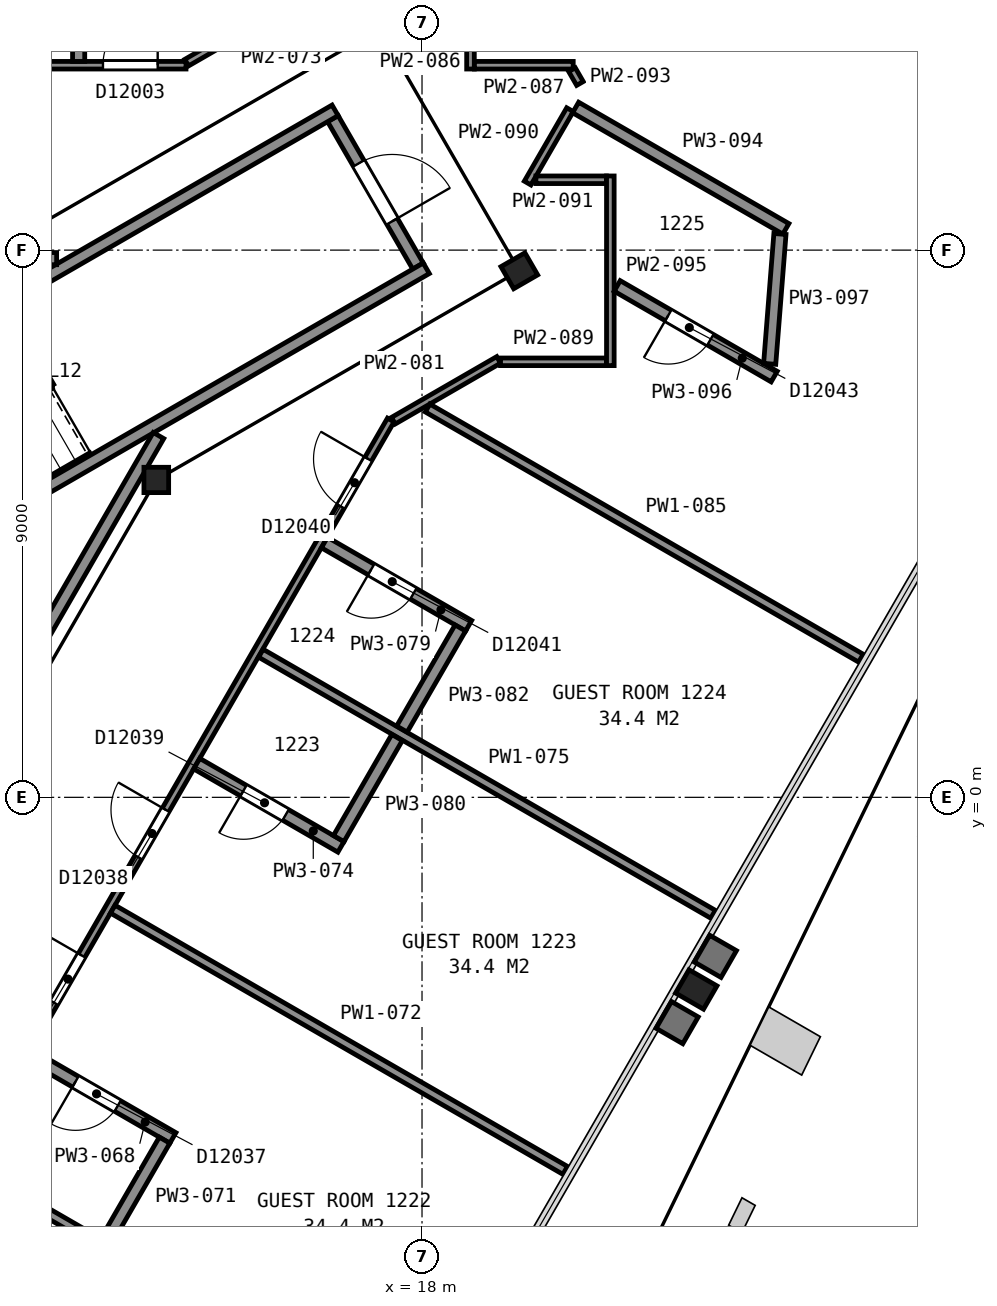
"""IFC4 building model, lengths in metres.
Left out: names, types, materials, properties, quantities, classifications, styles, units other than length and angle.
Written with IfcOpenShell. Run it as: python <this file> out.ifc"""

import sys

from ifc_helpers import new_model, si_unit, direction, frame, frame_2d, origin, origin_2d, place, context, subcontext, project, spatial, rectangle, i_section, extrude, element, fill, save


model = new_model("IFC4")
c1 = context("Model", 3, precision=1e-05, world=origin(), true_north=direction((0.0, 1.0)))
c2 = subcontext(c1, "Body", "Model", "MODEL_VIEW")
j1 = project(units=[si_unit("LENGTHUNIT", "METRE"), si_unit("PLANEANGLEUNIT", "RADIAN")], contexts=[c1])
p1 = place(None, origin())
s1 = spatial("IfcSite", under=j1, at=p1, CompositionType="ELEMENT")
p2 = place(p1, origin())
s2 = spatial("IfcBuilding", under=s1, at=p2, CompositionType="ELEMENT")
p3 = place(p2, frame((0.0, 0.0, 58.4)))
s3 = spatial("IfcBuildingStorey", under=s2, at=p3, CompositionType="ELEMENT", Elevation=58.4)
p4 = place(p3, frame((22.51, -3.16, 0.0), z_axis=(0.0, 0.0, 1.0), x_axis=(-0.5, -0.866025403784, 0.0)))
e1 = element("IfcColumn", 1, at=p4, inside=s3, PredefinedType="COLUMN", context=c2, shape_type="SweptSolid", body=[
    extrude(i_section(OverallWidth=0.442, OverallDepth=0.531, WebThickness=0.066, FlangeThickness=0.106, FilletRadius=0.015, at=origin_2d()), origin(), (0.0, 0.0, 1.0), 3.575),
])
p5 = place(p3, frame((13.63, 5.22, 0.0), z_axis=(0.0, 0.0, 1.0), x_axis=(1.0, 0.0, 0.0)))
e2 = element("IfcColumn", 2, at=p5, inside=s3, PredefinedType="COLUMN", context=c2, shape_type="SweptSolid", body=[
    extrude(i_section(OverallWidth=0.406, OverallDepth=0.417, WebThickness=0.03, FlangeThickness=0.048, FilletRadius=0.015, at=origin_2d()), origin(), (0.0, 0.0, 1.0), 3.6),
])
p6 = place(p3, frame((19.6, 8.66, 0.0), z_axis=(0.0, 0.0, 1.0), x_axis=(0.5, -0.866025403784, 0.0)))
e3 = element("IfcColumn", 3, at=p6, inside=s3, PredefinedType="COLUMN", context=c2, shape_type="SweptSolid", body=[
    extrude(i_section(OverallWidth=0.419, OverallDepth=0.455, WebThickness=0.042, FlangeThickness=0.068, FilletRadius=0.015, at=origin_2d()), origin(), (0.0, 0.0, 1.0), 3.6),
])
p7 = place(p3, frame((17.934, 8.738, 0.0), z_axis=(0.0, 0.0, 1.0), x_axis=(-0.49998411664, 0.866034573852, 0.0)))
e4 = element("IfcWall", 4, at=p7, inside=s3, PredefinedType="PARTITIONING", context=c2, shape_type="SweptSolid", body=[
    extrude(rectangle(XDim=2.8, YDim=0.2, at=frame_2d((1.4, 0.0))), origin(), (0.0, 0.0, 1.0), 3.35),
])
p8 = place(p7, frame((0.85, 0.0, 0.0)))
e5 = element("IfcOpeningElement", 5, at=p8, cuts=e4, PredefinedType="OPENING", context=c2, shape_type="SweptSolid", body=[
    extrude(rectangle(XDim=1.1, YDim=2.1, at=frame_2d((0.55, 1.05))), frame((0.0, 0.11, 0.0), z_axis=(0.0, -1.0, 0.0), x_axis=(1.0, 0.0, 0.0)), (0.0, 0.0, 1.0), 0.22),
])
for number, where, z_axis, x_axis in (
    (6, (6.178, 5.299, 0.0), (0.0, 0.0, 1.0), (0.866, 0.5, 0.0)),
    (7, (7.678, 2.701, 0.0), (0.0, 0.0, 1.0), (0.866, 0.5, 0.0)),
):
    element("IfcWall", number, at=place(p3, frame(where, z_axis=z_axis, x_axis=x_axis)), inside=s3, PredefinedType="PARTITIONING", context=c2, shape_type="SweptSolid", body=[
        extrude(rectangle(XDim=12.0, YDim=0.2, at=frame_2d((6.0, 0.0))), origin(), (0.0, 0.0, 1.0), 3.35),
    ])
p9 = place(p3, frame((6.177, 8.86, 0.0), z_axis=(0.0, 0.0, 1.0), x_axis=(1.0, 0.0, 0.0)))
e8 = element("IfcWall", 8, at=p9, inside=s3, PredefinedType="PARTITIONING", context=c2, shape_type="SweptSolid", body=[
    extrude(rectangle(XDim=5.814, YDim=0.2, at=frame_2d((2.907, 0.0))), origin(), (0.0, 0.0, 1.0), 3.35),
])
p10 = place(p3, frame((8.492, -3.012, 0.0), z_axis=(0.0, 0.0, 1.0), x_axis=(0.499972957231, 0.866041016371, 0.0)))
e9 = element("IfcWall", 9, at=p10, inside=s3, PredefinedType="PARTITIONING", context=c2, shape_type="SweptSolid", body=[
    extrude(rectangle(XDim=10.349, YDim=0.2, at=frame_2d((5.174, 0.0))), origin(), (0.0, 0.0, 1.0), 3.35),
])
p11 = place(p3, frame((-9.036, 12.041, 0.0), z_axis=(0.0, 0.0, 1.0), x_axis=(1.0, 0.0, 0.0)))
e10 = element("IfcWall", 10, at=p11, inside=s3, PredefinedType="PARTITIONING", context=c2, shape_type="SweptSolid", body=[
    extrude(rectangle(XDim=23.154, YDim=0.125, at=frame_2d((11.577, 0.0))), origin(), (0.0, 0.0, 1.0), 2.613),
])
p12 = place(p11, frame((21.789, 0.0, 0.0)))
e11 = element("IfcOpeningElement", 11, at=p12, cuts=e10, PredefinedType="OPENING", context=c2, shape_type="SweptSolid", body=[
    extrude(rectangle(XDim=0.9, YDim=2.1, at=frame_2d((0.45, 1.05))), frame((0.0, 0.073, 0.0), z_axis=(0.0, -1.0, 0.0), x_axis=(1.0, 0.0, 0.0)), (0.0, 0.0, 1.0), 0.145),
])
p13 = place(p11, frame((15.375, 0.0, 0.0)))
e12 = element("IfcOpeningElement", 12, at=p13, cuts=e10, PredefinedType="OPENING", context=c2, shape_type="SweptSolid", body=[
    extrude(rectangle(XDim=0.9, YDim=2.1, at=frame_2d((0.45, 1.05))), frame((0.0, 0.073, 0.0), z_axis=(0.0, -1.0, 0.0), x_axis=(1.0, 0.0, 0.0)), (0.0, 0.0, 1.0), 0.145),
])
p14 = place(p11, frame((12.81, 0.0, 0.0)))
e13 = element("IfcOpeningElement", 13, at=p14, cuts=e10, PredefinedType="OPENING", context=c2, shape_type="SweptSolid", body=[
    extrude(rectangle(XDim=0.9, YDim=2.1, at=frame_2d((0.45, 1.05))), frame((0.0, 0.073, 0.0), z_axis=(0.0, -1.0, 0.0), x_axis=(1.0, 0.0, 0.0)), (0.0, 0.0, 1.0), 0.145),
])
p15 = place(p11, frame((6.046, 0.0, 0.0)))
e14 = element("IfcOpeningElement", 14, at=p15, cuts=e10, PredefinedType="OPENING", context=c2, shape_type="SweptSolid", body=[
    extrude(rectangle(XDim=0.9, YDim=2.1, at=frame_2d((0.45, 1.05))), frame((0.0, 0.073, 0.0), z_axis=(0.0, -1.0, 0.0), x_axis=(1.0, 0.0, 0.0)), (0.0, 0.0, 1.0), 0.145),
])
p16 = place(p11, frame((3.224, 0.0, 0.0)))
e15 = element("IfcOpeningElement", 15, at=p16, cuts=e10, PredefinedType="OPENING", context=c2, shape_type="SweptSolid", body=[
    extrude(rectangle(XDim=0.9, YDim=2.1, at=frame_2d((0.45, 1.05))), frame((0.0, 0.073, 0.0), z_axis=(0.0, -1.0, 0.0), x_axis=(1.0, 0.0, 0.0)), (0.0, 0.0, 1.0), 0.145),
])
p17 = place(p3, frame((17.486, 6.206, 0.0), z_axis=(0.0, 0.0, 1.0), x_axis=(-0.499990458811, -0.866030912322, 0.0)))
e16 = element("IfcWall", 16, at=p17, inside=s3, PredefinedType="PARTITIONING", context=c2, shape_type="SweptSolid", body=[
    extrude(rectangle(XDim=27.441, YDim=0.125, at=frame_2d((13.721, 0.0))), origin(), (0.0, 0.0, 1.0), 2.613),
])
p18 = place(p17, frame((20.529, 0.0, 0.0)))
e17 = element("IfcOpeningElement", 17, at=p18, cuts=e16, PredefinedType="OPENING", context=c2, shape_type="SweptSolid", body=[
    extrude(rectangle(XDim=0.9, YDim=2.1, at=frame_2d((0.45, 1.05))), frame((0.0, 0.073, 0.0), z_axis=(0.0, -1.0, 0.0), x_axis=(1.0, 0.0, 0.0)), (0.0, 0.0, 1.0), 0.145),
])
p19 = place(p17, frame((17.516, 0.0, 0.0)))
e18 = element("IfcOpeningElement", 18, at=p19, cuts=e16, PredefinedType="OPENING", context=c2, shape_type="SweptSolid", body=[
    extrude(rectangle(XDim=0.9, YDim=2.1, at=frame_2d((0.45, 1.05))), frame((0.0, 0.073, 0.0), z_axis=(0.0, -1.0, 0.0), x_axis=(1.0, 0.0, 0.0)), (0.0, 0.0, 1.0), 0.145),
])
p20 = place(p17, frame((10.168, 0.0, 0.0)))
e19 = element("IfcOpeningElement", 19, at=p20, cuts=e16, PredefinedType="OPENING", context=c2, shape_type="SweptSolid", body=[
    extrude(rectangle(XDim=0.9, YDim=2.1, at=frame_2d((0.45, 1.05))), frame((0.0, 0.073, 0.0), z_axis=(0.0, -1.0, 0.0), x_axis=(1.0, 0.0, 0.0)), (0.0, 0.0, 1.0), 0.145),
])
p21 = place(p17, frame((7.403, 0.0, 0.0)))
e20 = element("IfcOpeningElement", 20, at=p21, cuts=e16, PredefinedType="OPENING", context=c2, shape_type="SweptSolid", body=[
    extrude(rectangle(XDim=0.9, YDim=2.1, at=frame_2d((0.45, 1.05))), frame((0.0, 0.073, 0.0), z_axis=(0.0, -1.0, 0.0), x_axis=(1.0, 0.0, 0.0)), (0.0, 0.0, 1.0), 0.145),
])
p22 = place(p17, frame((0.741, 0.0, 0.0)))
e21 = element("IfcOpeningElement", 21, at=p22, cuts=e16, PredefinedType="OPENING", context=c2, shape_type="SweptSolid", body=[
    extrude(rectangle(XDim=0.9, YDim=2.1, at=frame_2d((0.45, 1.05))), frame((0.0, 0.073, 0.0), z_axis=(0.0, -1.0, 0.0), x_axis=(1.0, 0.0, 0.0)), (0.0, 0.0, 1.0), 0.145),
])
p23 = place(p3, frame((10.482, -6.051, 0.0), z_axis=(0.0, 0.0, 1.0), x_axis=(0.865978298045, -0.500081580659, 0.0)))
e22 = element("IfcWall", 22, at=p23, inside=s3, PredefinedType="PARTITIONING", context=c2, shape_type="SweptSolid", body=[
    extrude(rectangle(XDim=8.591, YDim=0.15, at=frame_2d((4.296, 0.0))), origin(), (0.0, 0.0, 1.0), 2.613),
])
p24 = place(p3, frame((13.903, -5.602, 0.0), z_axis=(0.0, 0.0, 1.0), x_axis=(-0.86596722502, 0.50010075504, 0.0)))
e23 = element("IfcWall", 23, at=p24, inside=s3, PredefinedType="PARTITIONING", context=c2, shape_type="SweptSolid", body=[
    extrude(rectangle(XDim=2.737, YDim=0.2, at=frame_2d((1.369, 0.0))), origin(), (0.0, 0.0, 1.0), 2.613),
])
p25 = place(p24, frame((1.05, 0.0, 0.0)))
e24 = element("IfcOpeningElement", 24, at=p25, cuts=e23, PredefinedType="OPENING", context=c2, shape_type="SweptSolid", body=[
    extrude(rectangle(XDim=0.8, YDim=2.1, at=frame_2d((0.4, 1.05))), frame((0.0, 0.11, 0.0), z_axis=(0.0, -1.0, 0.0), x_axis=(1.0, 0.0, 0.0)), (0.0, 0.0, 1.0), 0.22),
])
p26 = place(p3, frame((12.353, 12.104, 0.0), z_axis=(0.0, 0.0, 1.0), x_axis=(0.0, 1.0, 0.0)))
e25 = element("IfcWall", 25, at=p26, inside=s3, PredefinedType="PARTITIONING", context=c2, shape_type="SweptSolid", body=[
    extrude(rectangle(XDim=2.837, YDim=0.2, at=frame_2d((1.419, 0.0))), origin(), (0.0, 0.0, 1.0), 2.613),
])
p27 = place(p3, frame((12.803, -7.305, 0.0), z_axis=(0.0, 0.0, 1.0), x_axis=(0.500150762069, 0.865938343765, 0.0)))
e26 = element("IfcWall", 26, at=p27, inside=s3, PredefinedType="PARTITIONING", context=c2, shape_type="SweptSolid", body=[
    extrude(rectangle(XDim=1.924, YDim=0.2, at=frame_2d((0.962, 0.0))), origin(), (0.0, 0.0, 1.0), 2.613),
])
p28 = place(p3, frame((12.914, -1.839, 0.0), z_axis=(0.0, 0.0, 1.0), x_axis=(0.866010015463, -0.500026652407, 0.0)))
e27 = element("IfcWall", 27, at=p28, inside=s3, PredefinedType="PARTITIONING", context=c2, shape_type="SweptSolid", body=[
    extrude(rectangle(XDim=8.591, YDim=0.15, at=frame_2d((4.296, 0.0))), origin(), (0.0, 0.0, 1.0), 2.613),
])
p29 = place(p3, frame((14.13, 12.083, 0.0), z_axis=(0.0, 0.0, 1.0), x_axis=(0.865936922628, 0.500153222552, 0.0)))
e28 = element("IfcWall", 28, at=p29, inside=s3, PredefinedType="PARTITIONING", context=c2, shape_type="SweptSolid", body=[
    extrude(rectangle(XDim=1.995, YDim=0.125, at=frame_2d((0.998, 0.0))), origin(), (0.0, 0.0, 1.0), 2.613),
])
p30 = place(p3, frame((14.295, 0.554, 0.0), z_axis=(0.0, 0.0, 1.0), x_axis=(0.866095017657, -0.499879405846, 0.0)))
e29 = element("IfcWall", 29, at=p30, inside=s3, PredefinedType="PARTITIONING", context=c2, shape_type="SweptSolid", body=[
    extrude(rectangle(XDim=2.738, YDim=0.2, at=frame_2d((1.369, 0.0))), origin(), (0.0, 0.0, 1.0), 2.613),
])
p31 = place(p30, frame((0.887, 0.0, 0.0)))
e30 = element("IfcOpeningElement", 30, at=p31, cuts=e29, PredefinedType="OPENING", context=c2, shape_type="SweptSolid", body=[
    extrude(rectangle(XDim=0.8, YDim=2.1, at=frame_2d((0.4, 1.05))), frame((0.0, 0.11, 0.0), z_axis=(0.0, -1.0, 0.0), x_axis=(1.0, 0.0, 0.0)), (0.0, 0.0, 1.0), 0.22),
])
p32 = place(p3, frame((15.349, 2.37, 0.0), z_axis=(0.0, 0.0, 1.0), x_axis=(0.866033609522, -0.499985786976, 0.0)))
e31 = element("IfcWall", 31, at=p32, inside=s3, PredefinedType="PARTITIONING", context=c2, shape_type="SweptSolid", body=[
    extrude(rectangle(XDim=8.587, YDim=0.15, at=frame_2d((4.293, 0.0))), origin(), (0.0, 0.0, 1.0), 2.613),
])
p33 = place(p3, frame((18.767, 2.822, 0.0), z_axis=(0.0, 0.0, 1.0), x_axis=(-0.866117296485, 0.499840803386, 0.0)))
e32 = element("IfcWall", 32, at=p33, inside=s3, PredefinedType="PARTITIONING", context=c2, shape_type="SweptSolid", body=[
    extrude(rectangle(XDim=2.738, YDim=0.2, at=frame_2d((1.369, 0.0))), origin(), (0.0, 0.0, 1.0), 2.613),
])
p34 = place(p33, frame((1.051, 0.0, 0.0)))
e33 = element("IfcOpeningElement", 33, at=p34, cuts=e32, PredefinedType="OPENING", context=c2, shape_type="SweptSolid", body=[
    extrude(rectangle(XDim=0.8, YDim=2.1, at=frame_2d((0.4, 1.05))), frame((0.0, 0.11, 0.0), z_axis=(0.0, -1.0, 0.0), x_axis=(1.0, 0.0, 0.0)), (0.0, 0.0, 1.0), 0.22),
])
p35 = place(p3, frame((16.63, -0.678, 0.0), z_axis=(0.0, 0.0, 1.0), x_axis=(0.49992795321, 0.866066996022, 0.0)))
e34 = element("IfcWall", 34, at=p35, inside=s3, PredefinedType="PARTITIONING", context=c2, shape_type="SweptSolid", body=[
    extrude(rectangle(XDim=1.92, YDim=0.2, at=frame_2d((0.96, 0.0))), origin(), (0.0, 0.0, 1.0), 2.613),
])
p36 = place(p3, frame((17.529, 6.195, 0.0), z_axis=(0.0, 0.0, 1.0), x_axis=(0.866002566612, 0.500039553057, 0.0)))
e35 = element("IfcWall", 35, at=p36, inside=s3, PredefinedType="PARTITIONING", context=c2, shape_type="SweptSolid", body=[
    extrude(rectangle(XDim=1.999, YDim=0.125, at=frame_2d((1.0, 0.0))), origin(), (0.0, 0.0, 1.0), 2.613),
])
p37 = place(p3, frame((17.669, 1.123, 0.0), z_axis=(0.0, 0.0, 1.0), x_axis=(0.500269123289, 0.865869969617, 0.0)))
e36 = element("IfcWall", 36, at=p37, inside=s3, PredefinedType="PARTITIONING", context=c2, shape_type="SweptSolid", body=[
    extrude(rectangle(XDim=1.92, YDim=0.2, at=frame_2d((0.96, 0.0))), origin(), (0.0, 0.0, 1.0), 2.613),
])
p38 = place(p3, frame((18.091, 6.403, 0.0), z_axis=(0.0, 0.0, 1.0), x_axis=(0.866038366034, -0.499977548053, 0.0)))
e37 = element("IfcWall", 37, at=p38, inside=s3, PredefinedType="PARTITIONING", context=c2, shape_type="SweptSolid", body=[
    extrude(rectangle(XDim=8.229, YDim=0.15, at=frame_2d((4.115, 0.0))), origin(), (0.0, 0.0, 1.0), 2.613),
])
p39 = place(p3, frame((18.797, 14.072, 0.0), z_axis=(0.0, 0.0, 1.0), x_axis=(0.0, -1.0, 0.0)))
e38 = element("IfcWall", 38, at=p39, inside=s3, PredefinedType="PARTITIONING", context=c2, shape_type="SweptSolid", body=[
    extrude(rectangle(XDim=2.094, YDim=0.125, at=frame_2d((1.047, 0.0))), origin(), (0.0, 0.0, 1.0), 2.613),
])
p40 = place(p39, frame((0.531, 0.0, 0.0)))
e39 = element("IfcOpeningElement", 39, at=p40, cuts=e38, PredefinedType="OPENING", context=c2, shape_type="SweptSolid", body=[
    extrude(rectangle(XDim=0.9, YDim=2.1, at=frame_2d((0.45, 1.05))), frame((0.0, 0.073, 0.0), z_axis=(0.0, -1.0, 0.0), x_axis=(1.0, 0.0, 0.0)), (0.0, 0.0, 1.0), 0.145),
])
p41 = place(p3, frame((18.862, 12.041, 0.0), z_axis=(0.0, 0.0, 1.0), x_axis=(1.0, 0.0, 0.0)))
e40 = element("IfcWall", 40, at=p41, inside=s3, PredefinedType="PARTITIONING", context=c2, shape_type="SweptSolid", body=[
    extrude(rectangle(XDim=1.625, YDim=0.125, at=frame_2d((0.812, 0.0))), origin(), (0.0, 0.0, 1.0), 2.613),
])
p42 = place(p3, frame((19.291, 7.163, 0.0), z_axis=(0.0, 0.0, 1.0), x_axis=(1.0, 0.0, 0.0)))
e41 = element("IfcWall", 41, at=p42, inside=s3, PredefinedType="PARTITIONING", context=c2, shape_type="SweptSolid", body=[
    extrude(rectangle(XDim=1.741, YDim=0.125, at=frame_2d((0.871, 0.0))), origin(), (0.0, 0.0, 1.0), 2.613),
])
p43 = place(p3, frame((19.737, 10.103, 0.0), z_axis=(0.0, 0.0, 1.0), x_axis=(0.499944854726, 0.866057239582, 0.0)))
e42 = element("IfcWall", 42, at=p43, inside=s3, PredefinedType="PARTITIONING", context=c2, shape_type="SweptSolid", body=[
    extrude(rectangle(XDim=1.394, YDim=0.125, at=frame_2d((0.697, 0.0))), origin(), (0.0, 0.0, 1.0), 2.613),
])
p44 = place(p3, frame((19.873, 10.157, 0.0), z_axis=(0.0, 0.0, 1.0), x_axis=(1.0, 0.0, 0.0)))
e43 = element("IfcWall", 43, at=p44, inside=s3, PredefinedType="PARTITIONING", context=c2, shape_type="SweptSolid", body=[
    extrude(rectangle(XDim=1.159, YDim=0.125, at=frame_2d((0.58, 0.0))), origin(), (0.0, 0.0, 1.0), 2.613),
])
p45 = place(p3, frame((20.467, 11.967, 0.0), z_axis=(0.0, 0.0, 1.0), x_axis=(0.500153222552, -0.865936922628, 0.0)))
e44 = element("IfcWall", 44, at=p45, inside=s3, PredefinedType="PARTITIONING", context=c2, shape_type="SweptSolid", body=[
    extrude(rectangle(XDim=0.262, YDim=0.125, at=frame_2d((0.131, 0.0))), origin(), (0.0, 0.0, 1.0), 2.613),
])
p46 = place(p3, frame((20.526, 11.346, 0.0), z_axis=(0.0, 0.0, 1.0), x_axis=(0.866089865591, -0.499888332251, 0.0)))
e45 = element("IfcWall", 45, at=p46, inside=s3, PredefinedType="PARTITIONING", context=c2, shape_type="SweptSolid", body=[
    extrude(rectangle(XDim=3.992, YDim=0.2, at=frame_2d((1.996, 0.0))), origin(), (0.0, 0.0, 1.0), 2.613),
])
p47 = place(p3, frame((21.097, 7.101, 0.0), z_axis=(0.0, 0.0, 1.0), x_axis=(0.0, 1.0, 0.0)))
e46 = element("IfcWall", 46, at=p47, inside=s3, PredefinedType="PARTITIONING", context=c2, shape_type="SweptSolid", body=[
    extrude(rectangle(XDim=3.119, YDim=0.125, at=frame_2d((1.56, 0.0))), origin(), (0.0, 0.0, 1.0), 2.613),
])
p48 = place(p3, frame((21.209, 8.411, 0.0), z_axis=(0.0, 0.0, 1.0), x_axis=(0.86595648724, -0.500119347963, 0.0)))
e47 = element("IfcWall", 47, at=p48, inside=s3, PredefinedType="PARTITIONING", context=c2, shape_type="SweptSolid", body=[
    extrude(rectangle(XDim=2.982, YDim=0.2, at=frame_2d((1.491, 0.0))), origin(), (0.0, 0.0, 1.0), 2.613),
])
p49 = place(p48, frame((0.97, 0.0, 0.0)))
e48 = element("IfcOpeningElement", 48, at=p49, cuts=e47, PredefinedType="OPENING", context=c2, shape_type="SweptSolid", body=[
    extrude(rectangle(XDim=0.8, YDim=2.1, at=frame_2d((0.4, 1.05))), frame((0.0, 0.11, 0.0), z_axis=(0.0, -1.0, 0.0), x_axis=(1.0, 0.0, 0.0)), (0.0, 0.0, 1.0), 0.22),
])
p50 = place(p3, frame((23.718, 7.129, 0.0), z_axis=(0.0, 0.0, 1.0), x_axis=(0.078848500899, 0.996886610355, 0.0)))
e49 = element("IfcWall", 49, at=p50, inside=s3, PredefinedType="PARTITIONING", context=c2, shape_type="SweptSolid", body=[
    extrude(rectangle(XDim=2.143, YDim=0.2, at=frame_2d((1.071, 0.0))), origin(), (0.0, 0.0, 1.0), 2.613),
])
p51 = place(p8, origin())
e50 = element("IfcDoor", 50, at=p51, inside=s3, OperationType="SINGLE_SWING_LEFT", PredefinedType="DOOR", context=c2, shape_type="SweptSolid", body=[
    extrude(rectangle(XDim=1.1, YDim=2.1, at=frame_2d((0.55, 1.05))), frame((0.0, 0.025, 0.0), z_axis=(0.0, -1.0, 0.0), x_axis=(1.0, 0.0, 0.0)), (0.0, 0.0, 1.0), 0.05),
])
fill(e5, e50)
p52 = place(p12, origin())
e51 = element("IfcDoor", 51, at=p52, inside=s3, OperationType="SINGLE_SWING_RIGHT", PredefinedType="DOOR", context=c2, shape_type="SweptSolid", body=[
    extrude(rectangle(XDim=0.9, YDim=2.1, at=frame_2d((0.45, 1.05))), frame((0.0, 0.025, 0.0), z_axis=(0.0, -1.0, 0.0), x_axis=(1.0, 0.0, 0.0)), (0.0, 0.0, 1.0), 0.05),
])
fill(e11, e51)
p53 = place(p20, origin())
e52 = element("IfcDoor", 52, at=p53, inside=s3, OperationType="SINGLE_SWING_LEFT", PredefinedType="DOOR", context=c2, shape_type="SweptSolid", body=[
    extrude(rectangle(XDim=0.9, YDim=2.1, at=frame_2d((0.45, 1.05))), frame((0.0, 0.025, 0.0), z_axis=(0.0, -1.0, 0.0), x_axis=(1.0, 0.0, 0.0)), (0.0, 0.0, 1.0), 0.05),
])
fill(e19, e52)
p54 = place(p21, origin())
e53 = element("IfcDoor", 53, at=p54, inside=s3, OperationType="SINGLE_SWING_LEFT", PredefinedType="DOOR", context=c2, shape_type="SweptSolid", body=[
    extrude(rectangle(XDim=0.9, YDim=2.1, at=frame_2d((0.45, 1.05))), frame((0.0, 0.025, 0.0), z_axis=(0.0, -1.0, 0.0), x_axis=(1.0, 0.0, 0.0)), (0.0, 0.0, 1.0), 0.05),
])
fill(e20, e53)
p55 = place(p22, origin())
e54 = element("IfcDoor", 54, at=p55, inside=s3, OperationType="SINGLE_SWING_LEFT", PredefinedType="DOOR", context=c2, shape_type="SweptSolid", body=[
    extrude(rectangle(XDim=0.9, YDim=2.1, at=frame_2d((0.45, 1.05))), frame((0.0, 0.025, 0.0), z_axis=(0.0, -1.0, 0.0), x_axis=(1.0, 0.0, 0.0)), (0.0, 0.0, 1.0), 0.05),
])
fill(e21, e54)
p56 = place(p25, origin())
e55 = element("IfcDoor", 55, at=p56, inside=s3, OperationType="SINGLE_SWING_RIGHT", PredefinedType="DOOR", context=c2, shape_type="SweptSolid", body=[
    extrude(rectangle(XDim=0.8, YDim=2.1, at=frame_2d((0.4, 1.05))), frame((0.0, 0.025, 0.0), z_axis=(0.0, -1.0, 0.0), x_axis=(1.0, 0.0, 0.0)), (0.0, 0.0, 1.0), 0.05),
])
fill(e24, e55)
p57 = place(p31, origin())
e56 = element("IfcDoor", 56, at=p57, inside=s3, OperationType="SINGLE_SWING_LEFT", PredefinedType="DOOR", context=c2, shape_type="SweptSolid", body=[
    extrude(rectangle(XDim=0.8, YDim=2.1, at=frame_2d((0.4, 1.05))), frame((0.0, 0.025, 0.0), z_axis=(0.0, -1.0, 0.0), x_axis=(1.0, 0.0, 0.0)), (0.0, 0.0, 1.0), 0.05),
])
fill(e30, e56)
p58 = place(p34, origin())
e57 = element("IfcDoor", 57, at=p58, inside=s3, OperationType="SINGLE_SWING_RIGHT", PredefinedType="DOOR", context=c2, shape_type="SweptSolid", body=[
    extrude(rectangle(XDim=0.8, YDim=2.1, at=frame_2d((0.4, 1.05))), frame((0.0, 0.025, 0.0), z_axis=(0.0, -1.0, 0.0), x_axis=(1.0, 0.0, 0.0)), (0.0, 0.0, 1.0), 0.05),
])
fill(e33, e57)
p59 = place(p49, origin())
e58 = element("IfcDoor", 58, at=p59, inside=s3, OperationType="SINGLE_SWING_LEFT", PredefinedType="DOOR", context=c2, shape_type="SweptSolid", body=[
    extrude(rectangle(XDim=0.8, YDim=2.1, at=frame_2d((0.4, 1.05))), frame((0.0, 0.025, 0.0), z_axis=(0.0, -1.0, 0.0), x_axis=(1.0, 0.0, 0.0)), (0.0, 0.0, 1.0), 0.05),
])
fill(e48, e58)
save(model, sys.argv[1])
